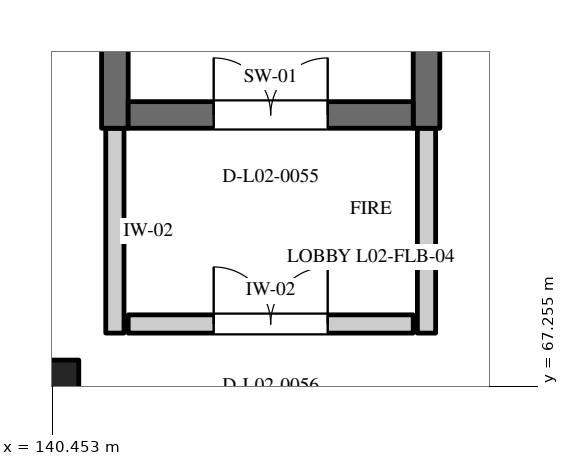
"""IFC4 building model, lengths in metres.
Left out: names, types, materials, properties, quantities, classifications, styles, units other than length and angle.
Written with IfcOpenShell. Run it as: python <this file> out.ifc"""

import sys

from ifc_helpers import new_model, si_unit, direction, frame, frame_2d, origin, origin_2d, place, context, subcontext, project, spatial, rectangle, extrude, element, fill, save


model = new_model("IFC4")
c1 = context("Model", 3, precision=1e-05, world=origin(), true_north=direction((0.0, 1.0)))
c2 = subcontext(c1, "Body", "Model", "MODEL_VIEW")
j1 = project(units=[si_unit("LENGTHUNIT", "METRE"), si_unit("PLANEANGLEUNIT", "RADIAN")], contexts=[c1])
p1 = place(None, origin())
s1 = spatial("IfcSite", under=j1, at=p1, CompositionType="ELEMENT")
p2 = place(p1, origin())
s2 = spatial("IfcBuilding", under=s1, at=p2, CompositionType="ELEMENT")
p3 = place(p2, frame((0.0, 0.0, 9.6)))
s3 = spatial("IfcBuildingStorey", under=s2, at=p3, CompositionType="ELEMENT", Elevation=9.6)
p4 = place(p3, frame((140.4, 67.2, 0.0), z_axis=(0.0, 0.0, 1.0), x_axis=(1.0, 0.0, 0.0)))
e1 = element("IfcColumn", 1, at=p4, inside=s3, PredefinedType="COLUMN", context=c2, shape_type="SweptSolid", body=[
    extrude(rectangle(XDim=0.8, YDim=0.8, at=origin_2d()), origin(), (0.0, 0.0, 1.0), 4.8),
])
for number, where, z_axis, x_axis in (
    (2, (141.275, 70.65, 0.0), (0.0, 0.0, 1.0), (0.0, 1.0, 0.0)),
    (3, (145.375, 70.65, 0.0), (0.0, 0.0, 1.0), (0.0, 1.0, 0.0)),
):
    element("IfcWall", number, at=place(p3, frame(where, z_axis=z_axis, x_axis=x_axis)), inside=s3, PredefinedType="SHEAR", context=c2, shape_type="SweptSolid", body=[
        extrude(rectangle(XDim=10.5, YDim=0.35, at=frame_2d((5.25, 0.0))), origin(), (0.0, 0.0, 1.0), 4.8),
    ])
p5 = place(p3, frame((141.45, 70.825, 0.0), z_axis=(0.0, 0.0, 1.0), x_axis=(1.0, 0.0, 0.0)))
e4 = element("IfcWall", 4, at=p5, inside=s3, PredefinedType="SHEAR", context=c2, shape_type="SweptSolid", body=[
    extrude(rectangle(XDim=3.75, YDim=0.35, at=frame_2d((1.875, 0.0))), origin(), (0.0, 0.0, 1.0), 4.5),
])
p6 = place(p5, frame((1.125, 0.0, 0.0)))
e5 = element("IfcOpeningElement", 5, at=p6, cuts=e4, PredefinedType="OPENING", context=c2, shape_type="SweptSolid", body=[
    extrude(rectangle(XDim=1.5, YDim=2.2, at=frame_2d((0.75, 1.1))), frame((0.0, 0.187, 0.0), z_axis=(0.0, -1.0, 0.0), x_axis=(1.0, 0.0, 0.0)), (0.0, 0.0, 1.0), 0.374),
])
for number, where, z_axis, x_axis in (
    (6, (141.275, 67.955, 0.0), (0.0, 0.0, 1.0), (0.0, 1.0, 0.0)),
    (7, (145.375, 67.955, 0.0), (0.0, 0.0, 1.0), (0.0, 1.0, 0.0)),
):
    element("IfcWall", number, at=place(p3, frame(where, z_axis=z_axis, x_axis=x_axis)), inside=s3, PredefinedType="STANDARD", context=c2, shape_type="SweptSolid", body=[
        extrude(rectangle(XDim=2.695, YDim=0.24, at=frame_2d((1.347, 0.0))), origin(), (0.0, 0.0, 1.0), 4.5),
    ])
p7 = place(p3, frame((141.45, 68.075, 0.0), z_axis=(0.0, 0.0, 1.0), x_axis=(1.0, 0.0, 0.0)))
e8 = element("IfcWall", 8, at=p7, inside=s3, PredefinedType="STANDARD", context=c2, shape_type="SweptSolid", body=[
    extrude(rectangle(XDim=3.75, YDim=0.24, at=frame_2d((1.875, 0.0))), origin(), (0.0, 0.0, 1.0), 4.5),
])
p8 = place(p7, frame((1.125, 0.0, 0.0)))
e9 = element("IfcOpeningElement", 9, at=p8, cuts=e8, PredefinedType="OPENING", context=c2, shape_type="SweptSolid", body=[
    extrude(rectangle(XDim=1.5, YDim=2.2, at=frame_2d((0.75, 1.1))), frame((0.0, 0.132, 0.0), z_axis=(0.0, -1.0, 0.0), x_axis=(1.0, 0.0, 0.0)), (0.0, 0.0, 1.0), 0.264),
])
p9 = place(p6, origin())
e10 = element("IfcDoor", 10, at=p9, inside=s3, OperationType="DOUBLE_DOOR_SINGLE_SWING", PredefinedType="DOOR", context=c2, shape_type="SweptSolid", body=[
    extrude(rectangle(XDim=1.5, YDim=2.2, at=frame_2d((0.75, 1.1))), frame((0.0, 0.025, 0.0), z_axis=(0.0, -1.0, 0.0), x_axis=(1.0, 0.0, 0.0)), (0.0, 0.0, 1.0), 0.05),
])
fill(e5, e10)
p10 = place(p8, origin())
e11 = element("IfcDoor", 11, at=p10, inside=s3, OperationType="DOUBLE_DOOR_SINGLE_SWING", PredefinedType="DOOR", context=c2, shape_type="SweptSolid", body=[
    extrude(rectangle(XDim=1.5, YDim=2.2, at=frame_2d((0.75, 1.1))), frame((0.0, 0.025, 0.0), z_axis=(0.0, -1.0, 0.0), x_axis=(1.0, 0.0, 0.0)), (0.0, 0.0, 1.0), 0.05),
])
fill(e9, e11)
save(model, sys.argv[1])
